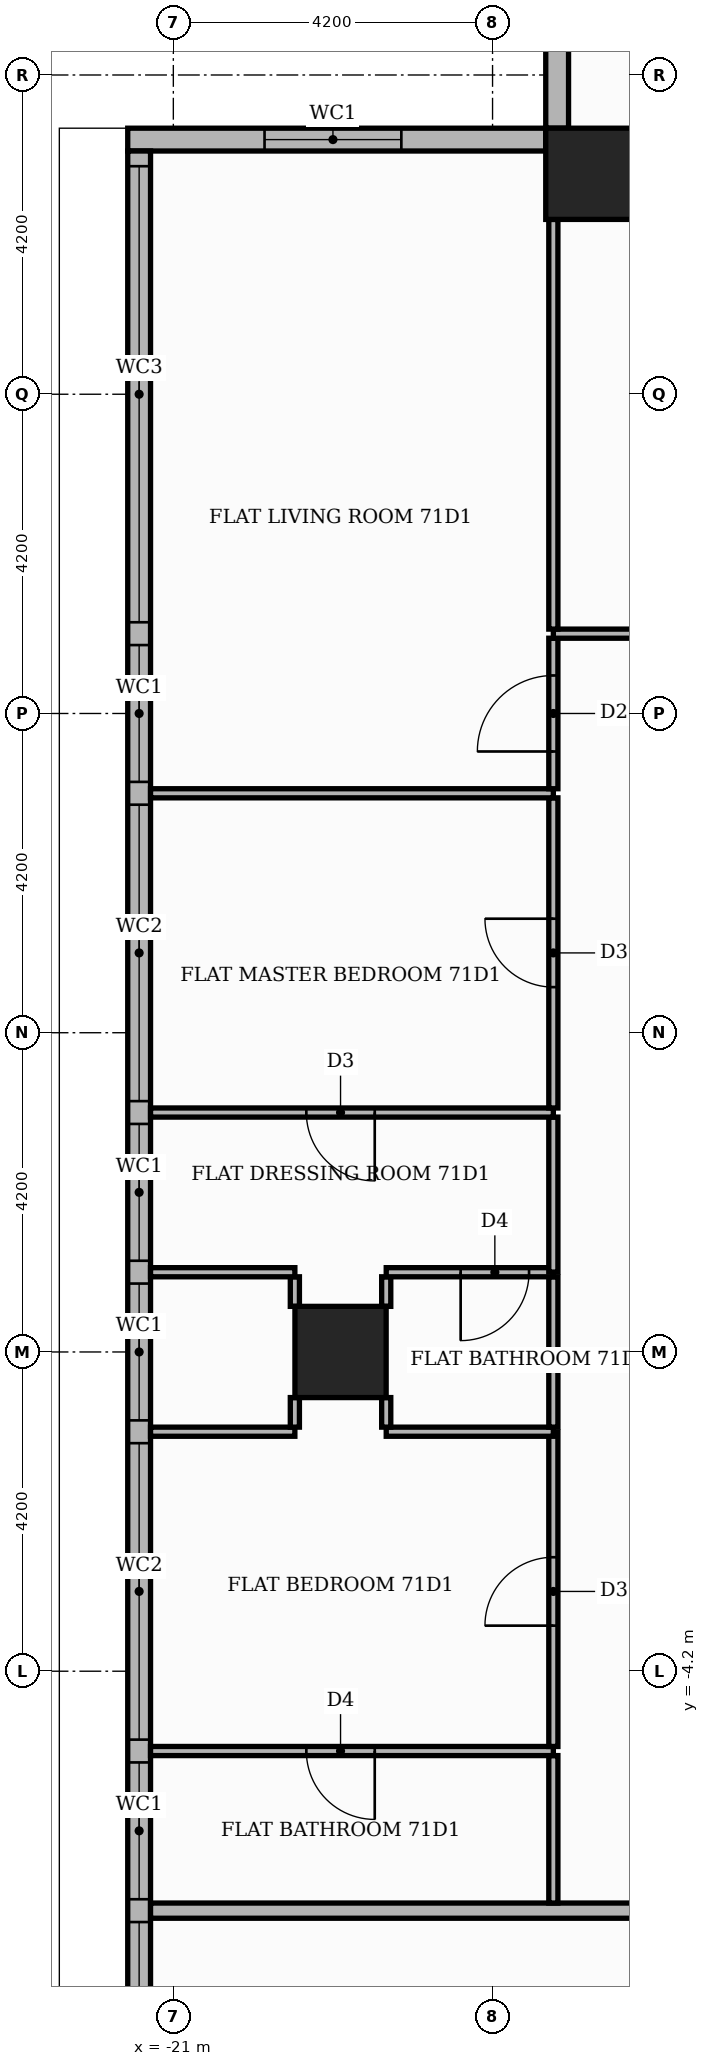
"""IFC4 building model, lengths in metres.
Left out: names, types, materials, properties, quantities, classifications, styles, units other than length and angle.
Written with IfcOpenShell. Run it as: python <this file> out.ifc"""

import sys

from ifc_helpers import new_model, si_unit, direction, frame, frame_2d, origin, origin_2d, place, context, subcontext, project, spatial, rectangle, extrude, element, fill, save


model = new_model("IFC4")
c1 = context("Model", 3, precision=1e-05, world=origin(), true_north=direction((0.0, 1.0)))
c2 = subcontext(c1, "Body", "Model", "MODEL_VIEW")
j1 = project(units=[si_unit("LENGTHUNIT", "METRE"), si_unit("PLANEANGLEUNIT", "RADIAN")], contexts=[c1])
p1 = place(None, origin())
s1 = spatial("IfcSite", under=j1, at=p1, CompositionType="ELEMENT")
p2 = place(p1, origin())
s2 = spatial("IfcBuilding", under=s1, at=p2, CompositionType="ELEMENT")
p3 = place(p2, frame((0.0, 0.0, 296.7)))
s3 = spatial("IfcBuildingStorey", under=s2, at=p3, CompositionType="ELEMENT", Elevation=296.7)
for number, where, z_axis, x_axis in (
    (1, (-18.8, 0.0, 0.0), (0.0, 0.0, 1.0), (1.0, 0.0, 0.0)),
    (2, (-15.5, 15.5, 0.0), (0.0, 0.0, 1.0), (1.0, 0.0, 0.0)),
):
    element("IfcColumn", number, at=place(p3, frame(where, z_axis=z_axis, x_axis=x_axis)), inside=s3, PredefinedType="COLUMN", context=c2, shape_type="SweptSolid", body=[
        extrude(rectangle(XDim=1.2, YDim=1.2, at=origin_2d()), origin(), (0.0, 0.0, 1.0), 3.9),
    ])
p4 = place(p3, frame((-15.95, 21.3, 0.0), z_axis=(0.0, 0.0, 1.0), x_axis=(0.0, -1.0, 0.0)))
e3 = element("IfcWall", 3, at=p4, inside=s3, PredefinedType="STANDARD", context=c2, shape_type="SweptSolid", body=[
    extrude(rectangle(XDim=5.2, YDim=0.3, at=frame_2d((2.6, 0.0))), origin(), (0.0, 0.0, 1.0), 3.55),
])
p5 = place(p4, frame((1.5, 0.0, 0.6)))
e4 = element("IfcOpeningElement", 4, at=p5, cuts=e3, PredefinedType="OPENING", context=c2, shape_type="SweptSolid", body=[
    extrude(rectangle(XDim=1.8, YDim=2.4, at=frame_2d((0.9, 1.2))), frame((0.0, 0.16, 0.0), z_axis=(0.0, -1.0, 0.0), x_axis=(1.0, 0.0, 0.0)), (0.0, 0.0, 1.0), 0.32),
])
p6 = place(p3, frame((-16.1, 15.95, 0.0), z_axis=(0.0, 0.0, 1.0), x_axis=(-1.0, 0.0, 0.0)))
e5 = element("IfcWall", 5, at=p6, inside=s3, PredefinedType="STANDARD", context=c2, shape_type="SweptSolid", body=[
    extrude(rectangle(XDim=5.5, YDim=0.3, at=frame_2d((2.75, 0.0))), origin(), (0.0, 0.0, 1.0), 3.55),
])
p7 = place(p6, frame((1.9, 0.0, 0.6)))
e6 = element("IfcOpeningElement", 6, at=p7, cuts=e5, PredefinedType="OPENING", context=c2, shape_type="SweptSolid", body=[
    extrude(rectangle(XDim=1.8, YDim=2.4, at=frame_2d((0.9, 1.2))), frame((0.0, 0.16, 0.0), z_axis=(0.0, -1.0, 0.0), x_axis=(1.0, 0.0, 0.0)), (0.0, 0.0, 1.0), 0.32),
])
p8 = place(p3, frame((-21.45, 15.8, 0.0), z_axis=(0.0, 0.0, 1.0), x_axis=(0.0, -1.0, 0.0)))
e7 = element("IfcWall", 7, at=p8, inside=s3, PredefinedType="STANDARD", context=c2, shape_type="SweptSolid", body=[
    extrude(rectangle(XDim=31.9, YDim=0.3, at=frame_2d((15.95, 0.0))), origin(), (0.0, 0.0, 1.0), 3.55),
])
p9 = place(p8, frame((0.2, 0.0, 0.6)))
e8 = element("IfcOpeningElement", 8, at=p9, cuts=e7, PredefinedType="OPENING", context=c2, shape_type="SweptSolid", body=[
    extrude(rectangle(XDim=6.0, YDim=2.4, at=frame_2d((3.0, 1.2))), frame((0.0, 0.16, 0.0), z_axis=(0.0, -1.0, 0.0), x_axis=(1.0, 0.0, 0.0)), (0.0, 0.0, 1.0), 0.32),
])
p10 = place(p8, frame((6.5, 0.0, 0.6)))
e9 = element("IfcOpeningElement", 9, at=p10, cuts=e7, PredefinedType="OPENING", context=c2, shape_type="SweptSolid", body=[
    extrude(rectangle(XDim=1.8, YDim=2.4, at=frame_2d((0.9, 1.2))), frame((0.0, 0.16, 0.0), z_axis=(0.0, -1.0, 0.0), x_axis=(1.0, 0.0, 0.0)), (0.0, 0.0, 1.0), 0.32),
])
p11 = place(p8, frame((8.6, 0.0, 0.6)))
e10 = element("IfcOpeningElement", 10, at=p11, cuts=e7, PredefinedType="OPENING", context=c2, shape_type="SweptSolid", body=[
    extrude(rectangle(XDim=3.9, YDim=2.4, at=frame_2d((1.95, 1.2))), frame((0.0, 0.16, 0.0), z_axis=(0.0, -1.0, 0.0), x_axis=(1.0, 0.0, 0.0)), (0.0, 0.0, 1.0), 0.32),
])
p12 = place(p8, frame((12.8, 0.0, 0.6)))
e11 = element("IfcOpeningElement", 11, at=p12, cuts=e7, PredefinedType="OPENING", context=c2, shape_type="SweptSolid", body=[
    extrude(rectangle(XDim=1.8, YDim=2.4, at=frame_2d((0.9, 1.2))), frame((0.0, 0.16, 0.0), z_axis=(0.0, -1.0, 0.0), x_axis=(1.0, 0.0, 0.0)), (0.0, 0.0, 1.0), 0.32),
])
p13 = place(p8, frame((14.9, 0.0, 0.6)))
e12 = element("IfcOpeningElement", 12, at=p13, cuts=e7, PredefinedType="OPENING", context=c2, shape_type="SweptSolid", body=[
    extrude(rectangle(XDim=1.8, YDim=2.4, at=frame_2d((0.9, 1.2))), frame((0.0, 0.16, 0.0), z_axis=(0.0, -1.0, 0.0), x_axis=(1.0, 0.0, 0.0)), (0.0, 0.0, 1.0), 0.32),
])
p14 = place(p8, frame((17.0, 0.0, 0.6)))
e13 = element("IfcOpeningElement", 13, at=p14, cuts=e7, PredefinedType="OPENING", context=c2, shape_type="SweptSolid", body=[
    extrude(rectangle(XDim=3.9, YDim=2.4, at=frame_2d((1.95, 1.2))), frame((0.0, 0.16, 0.0), z_axis=(0.0, -1.0, 0.0), x_axis=(1.0, 0.0, 0.0)), (0.0, 0.0, 1.0), 0.32),
])
p15 = place(p8, frame((21.2, 0.0, 0.6)))
e14 = element("IfcOpeningElement", 14, at=p15, cuts=e7, PredefinedType="OPENING", context=c2, shape_type="SweptSolid", body=[
    extrude(rectangle(XDim=1.8, YDim=2.4, at=frame_2d((0.9, 1.2))), frame((0.0, 0.16, 0.0), z_axis=(0.0, -1.0, 0.0), x_axis=(1.0, 0.0, 0.0)), (0.0, 0.0, 1.0), 0.32),
])
p16 = place(p8, frame((23.3, 0.0, 0.6)))
e15 = element("IfcOpeningElement", 15, at=p16, cuts=e7, PredefinedType="OPENING", context=c2, shape_type="SweptSolid", body=[
    extrude(rectangle(XDim=6.0, YDim=2.4, at=frame_2d((3.0, 1.2))), frame((0.0, 0.16, 0.0), z_axis=(0.0, -1.0, 0.0), x_axis=(1.0, 0.0, 0.0)), (0.0, 0.0, 1.0), 0.32),
])
p17 = place(p8, frame((29.6, 0.0, 0.6)))
e16 = element("IfcOpeningElement", 16, at=p17, cuts=e7, PredefinedType="OPENING", context=c2, shape_type="SweptSolid", body=[
    extrude(rectangle(XDim=1.8, YDim=2.4, at=frame_2d((0.9, 1.2))), frame((0.0, 0.16, 0.0), z_axis=(0.0, -1.0, 0.0), x_axis=(1.0, 0.0, 0.0)), (0.0, 0.0, 1.0), 0.32),
])
p18 = place(p3, frame((-21.3, -7.35, 0.0), z_axis=(0.0, 0.0, 1.0), x_axis=(1.0, 0.0, 0.0)))
e17 = element("IfcWall", 17, at=p18, inside=s3, PredefinedType="PARTITIONING", context=c2, shape_type="SweptSolid", body=[
    extrude(rectangle(XDim=28.65, YDim=0.2, at=frame_2d((14.325, 0.0))), origin(), (0.0, 0.0, 1.0), 3.55),
])
p19 = place(p18, frame((16.55, 0.0, 0.0)))
e18 = element("IfcOpeningElement", 18, at=p19, cuts=e17, PredefinedType="OPENING", context=c2, shape_type="SweptSolid", body=[
    extrude(rectangle(XDim=1.1, YDim=2.4, at=frame_2d((0.55, 1.2))), frame((0.0, 0.11, 0.0), z_axis=(0.0, -1.0, 0.0), x_axis=(1.0, 0.0, 0.0)), (0.0, 0.0, 1.0), 0.22),
])
p20 = place(p3, frame((-16.0, -7.25, 0.0), z_axis=(0.0, 0.0, 1.0), x_axis=(0.0, 1.0, 0.0)))
e19 = element("IfcWall", 19, at=p20, inside=s3, PredefinedType="PARTITIONING", context=c2, shape_type="SweptSolid", body=[
    extrude(rectangle(XDim=1.94, YDim=0.12, at=frame_2d((0.97, 0.0))), origin(), (0.0, 0.0, 1.0), 3.55),
])
p21 = place(p3, frame((-21.3, -5.25, 0.0), z_axis=(0.0, 0.0, 1.0), x_axis=(1.0, 0.0, 0.0)))
e20 = element("IfcWall", 20, at=p21, inside=s3, PredefinedType="PARTITIONING", context=c2, shape_type="SweptSolid", body=[
    extrude(rectangle(XDim=5.3, YDim=0.12, at=frame_2d((2.65, 0.0))), origin(), (0.0, 0.0, 1.0), 3.55),
])
p22 = place(p21, frame((2.05, 0.0, 0.0)))
e21 = element("IfcOpeningElement", 21, at=p22, cuts=e20, PredefinedType="OPENING", context=c2, shape_type="SweptSolid", body=[
    extrude(rectangle(XDim=0.9, YDim=2.1, at=frame_2d((0.45, 1.05))), frame((0.0, 0.07, 0.0), z_axis=(0.0, -1.0, 0.0), x_axis=(1.0, 0.0, 0.0)), (0.0, 0.0, 1.0), 0.14),
])
p23 = place(p3, frame((-16.0, -5.19, 0.0), z_axis=(0.0, 0.0, 1.0), x_axis=(0.0, 1.0, 0.0)))
e22 = element("IfcWall", 22, at=p23, inside=s3, PredefinedType="PARTITIONING", context=c2, shape_type="SweptSolid", body=[
    extrude(rectangle(XDim=4.139, YDim=0.12, at=frame_2d((2.069, 0.0))), origin(), (0.0, 0.0, 1.0), 3.55),
])
p24 = place(p23, frame((1.59, 0.0, 0.0)))
e23 = element("IfcOpeningElement", 23, at=p24, cuts=e22, PredefinedType="OPENING", context=c2, shape_type="SweptSolid", body=[
    extrude(rectangle(XDim=0.9, YDim=2.1, at=frame_2d((0.45, 1.05))), frame((0.0, 0.07, 0.0), z_axis=(0.0, -1.0, 0.0), x_axis=(1.0, 0.0, 0.0)), (0.0, 0.0, 1.0), 0.14),
])
p25 = place(p3, frame((-21.3, -1.049, 0.0), z_axis=(0.0, 0.0, 1.0), x_axis=(1.0, 0.0, 0.0)))
e24 = element("IfcWall", 24, at=p25, inside=s3, PredefinedType="PARTITIONING", context=c2, shape_type="SweptSolid", body=[
    extrude(rectangle(XDim=1.899, YDim=0.12, at=frame_2d((0.95, 0.0))), origin(), (0.0, 0.0, 1.0), 3.55),
])
p26 = place(p3, frame((-18.199, -1.049, 0.0), z_axis=(0.0, 0.0, 1.0), x_axis=(1.0, 0.0, 0.0)))
e25 = element("IfcWall", 25, at=p26, inside=s3, PredefinedType="PARTITIONING", context=c2, shape_type="SweptSolid", body=[
    extrude(rectangle(XDim=2.199, YDim=0.12, at=frame_2d((1.1, 0.0))), origin(), (0.0, 0.0, 1.0), 3.55),
])
for number, where, z_axis, x_axis in (
    (26, (-19.401, -0.989, 0.0), (0.0, 0.0, 1.0), (0.0, 1.0, 0.0)),
    (27, (-18.199, -0.989, 0.0), (0.0, 0.0, 1.0), (0.0, 1.0, 0.0)),
):
    element("IfcWall", number, at=place(p3, frame(where, z_axis=z_axis, x_axis=x_axis)), inside=s3, PredefinedType="PARTITIONING", context=c2, shape_type="SweptSolid", body=[
        extrude(rectangle(XDim=0.389, YDim=0.12, at=frame_2d((0.194, 0.0))), origin(), (0.0, 0.0, 1.0), 3.55),
    ])
p27 = place(p3, frame((-16.0, -0.989, 0.0), z_axis=(0.0, 0.0, 1.0), x_axis=(0.0, 1.0, 0.0)))
e28 = element("IfcWall", 28, at=p27, inside=s3, PredefinedType="PARTITIONING", context=c2, shape_type="SweptSolid", body=[
    extrude(rectangle(XDim=1.978, YDim=0.12, at=frame_2d((0.989, 0.0))), origin(), (0.0, 0.0, 1.0), 3.55),
])
for number, where, z_axis, x_axis in (
    (29, (-19.401, 0.6, 0.0), (0.0, 0.0, 1.0), (0.0, 1.0, 0.0)),
    (30, (-18.199, 0.6, 0.0), (0.0, 0.0, 1.0), (0.0, 1.0, 0.0)),
):
    element("IfcWall", number, at=place(p3, frame(where, z_axis=z_axis, x_axis=x_axis)), inside=s3, PredefinedType="PARTITIONING", context=c2, shape_type="SweptSolid", body=[
        extrude(rectangle(XDim=0.389, YDim=0.12, at=frame_2d((0.194, 0.0))), origin(), (0.0, 0.0, 1.0), 3.55),
    ])
p28 = place(p3, frame((-21.3, 1.049, 0.0), z_axis=(0.0, 0.0, 1.0), x_axis=(1.0, 0.0, 0.0)))
e31 = element("IfcWall", 31, at=p28, inside=s3, PredefinedType="PARTITIONING", context=c2, shape_type="SweptSolid", body=[
    extrude(rectangle(XDim=1.899, YDim=0.12, at=frame_2d((0.95, 0.0))), origin(), (0.0, 0.0, 1.0), 3.55),
])
p29 = place(p3, frame((-18.199, 1.049, 0.0), z_axis=(0.0, 0.0, 1.0), x_axis=(1.0, 0.0, 0.0)))
e32 = element("IfcWall", 32, at=p29, inside=s3, PredefinedType="PARTITIONING", context=c2, shape_type="SweptSolid", body=[
    extrude(rectangle(XDim=2.199, YDim=0.12, at=frame_2d((1.1, 0.0))), origin(), (0.0, 0.0, 1.0), 3.55),
])
p30 = place(p29, frame((0.979, 0.0, 0.0)))
e33 = element("IfcOpeningElement", 33, at=p30, cuts=e32, PredefinedType="OPENING", context=c2, shape_type="SweptSolid", body=[
    extrude(rectangle(XDim=0.9, YDim=2.1, at=frame_2d((0.45, 1.05))), frame((0.0, 0.07, 0.0), z_axis=(0.0, -1.0, 0.0), x_axis=(1.0, 0.0, 0.0)), (0.0, 0.0, 1.0), 0.14),
])
p31 = place(p3, frame((-16.0, 1.051, 0.0), z_axis=(0.0, 0.0, 1.0), x_axis=(0.0, 1.0, 0.0)))
e34 = element("IfcWall", 34, at=p31, inside=s3, PredefinedType="PARTITIONING", context=c2, shape_type="SweptSolid", body=[
    extrude(rectangle(XDim=2.039, YDim=0.12, at=frame_2d((1.02, 0.0))), origin(), (0.0, 0.0, 1.0), 3.55),
])
p32 = place(p3, frame((-21.3, 3.15, 0.0), z_axis=(0.0, 0.0, 1.0), x_axis=(1.0, 0.0, 0.0)))
e35 = element("IfcWall", 35, at=p32, inside=s3, PredefinedType="PARTITIONING", context=c2, shape_type="SweptSolid", body=[
    extrude(rectangle(XDim=5.3, YDim=0.12, at=frame_2d((2.65, 0.0))), origin(), (0.0, 0.0, 1.0), 3.55),
])
p33 = place(p32, frame((2.05, 0.0, 0.0)))
e36 = element("IfcOpeningElement", 36, at=p33, cuts=e35, PredefinedType="OPENING", context=c2, shape_type="SweptSolid", body=[
    extrude(rectangle(XDim=0.9, YDim=2.1, at=frame_2d((0.45, 1.05))), frame((0.0, 0.07, 0.0), z_axis=(0.0, -1.0, 0.0), x_axis=(1.0, 0.0, 0.0)), (0.0, 0.0, 1.0), 0.14),
])
p34 = place(p3, frame((-16.0, 3.21, 0.0), z_axis=(0.0, 0.0, 1.0), x_axis=(0.0, 1.0, 0.0)))
e37 = element("IfcWall", 37, at=p34, inside=s3, PredefinedType="PARTITIONING", context=c2, shape_type="SweptSolid", body=[
    extrude(rectangle(XDim=4.08, YDim=0.12, at=frame_2d((2.04, 0.0))), origin(), (0.0, 0.0, 1.0), 3.55),
])
p35 = place(p34, frame((1.59, 0.0, 0.0)))
e38 = element("IfcOpeningElement", 38, at=p35, cuts=e37, PredefinedType="OPENING", context=c2, shape_type="SweptSolid", body=[
    extrude(rectangle(XDim=0.9, YDim=2.1, at=frame_2d((0.45, 1.05))), frame((0.0, 0.07, 0.0), z_axis=(0.0, -1.0, 0.0), x_axis=(1.0, 0.0, 0.0)), (0.0, 0.0, 1.0), 0.14),
])
p36 = place(p3, frame((-21.3, 7.35, 0.0), z_axis=(0.0, 0.0, 1.0), x_axis=(1.0, 0.0, 0.0)))
e39 = element("IfcWall", 39, at=p36, inside=s3, PredefinedType="PARTITIONING", context=c2, shape_type="SweptSolid", body=[
    extrude(rectangle(XDim=5.3, YDim=0.12, at=frame_2d((2.65, 0.0))), origin(), (0.0, 0.0, 1.0), 3.55),
])
p37 = place(p3, frame((-16.0, 7.41, 0.0), z_axis=(0.0, 0.0, 1.0), x_axis=(0.0, 1.0, 0.0)))
e40 = element("IfcWall", 40, at=p37, inside=s3, PredefinedType="PARTITIONING", context=c2, shape_type="SweptSolid", body=[
    extrude(rectangle(XDim=1.98, YDim=0.12, at=frame_2d((0.99, 0.0))), origin(), (0.0, 0.0, 1.0), 3.55),
])
p38 = place(p37, frame((0.49, 0.0, 0.0)))
e41 = element("IfcOpeningElement", 41, at=p38, cuts=e40, PredefinedType="OPENING", context=c2, shape_type="SweptSolid", body=[
    extrude(rectangle(XDim=1.0, YDim=2.1, at=frame_2d((0.5, 1.05))), frame((0.0, 0.07, 0.0), z_axis=(0.0, -1.0, 0.0), x_axis=(1.0, 0.0, 0.0)), (0.0, 0.0, 1.0), 0.14),
])
p39 = place(p3, frame((-16.0, 9.45, 0.0), z_axis=(0.0, 0.0, 1.0), x_axis=(1.0, 0.0, 0.0)))
e42 = element("IfcWall", 42, at=p39, inside=s3, PredefinedType="PARTITIONING", context=c2, shape_type="SweptSolid", body=[
    extrude(rectangle(XDim=8.55, YDim=0.12, at=frame_2d((4.275, 0.0))), origin(), (0.0, 0.0, 1.0), 3.55),
])
p40 = place(p39, frame((3.875, 0.0, 0.0)))
e43 = element("IfcOpeningElement", 43, at=p40, cuts=e42, PredefinedType="OPENING", context=c2, shape_type="SweptSolid", body=[
    extrude(rectangle(XDim=0.9, YDim=2.1, at=frame_2d((0.45, 1.05))), frame((0.0, 0.07, 0.0), z_axis=(0.0, -1.0, 0.0), x_axis=(1.0, 0.0, 0.0)), (0.0, 0.0, 1.0), 0.14),
])
p41 = place(p3, frame((-16.0, 9.51, 0.0), z_axis=(0.0, 0.0, 1.0), x_axis=(0.0, 1.0, 0.0)))
e44 = element("IfcWall", 44, at=p41, inside=s3, PredefinedType="PARTITIONING", context=c2, shape_type="SweptSolid", body=[
    extrude(rectangle(XDim=5.39, YDim=0.12, at=frame_2d((2.695, 0.0))), origin(), (0.0, 0.0, 1.0), 3.55),
])
p42 = place(p7, origin())
e45 = element("IfcWindow", 45, at=p42, inside=s3, PartitioningType="SINGLE_PANEL", PredefinedType="WINDOW", context=c2, shape_type="SweptSolid", body=[
    extrude(rectangle(XDim=1.8, YDim=2.4, at=frame_2d((0.9, 1.2))), frame((0.0, 0.03, 0.0), z_axis=(0.0, -1.0, 0.0), x_axis=(1.0, 0.0, 0.0)), (0.0, 0.0, 1.0), 0.06),
])
fill(e6, e45)
p43 = place(p9, origin())
e46 = element("IfcWindow", 46, at=p43, inside=s3, PartitioningType="SINGLE_PANEL", PredefinedType="WINDOW", context=c2, shape_type="SweptSolid", body=[
    extrude(rectangle(XDim=6.0, YDim=2.4, at=frame_2d((3.0, 1.2))), frame((0.0, 0.03, 0.0), z_axis=(0.0, -1.0, 0.0), x_axis=(1.0, 0.0, 0.0)), (0.0, 0.0, 1.0), 0.06),
])
fill(e8, e46)
p44 = place(p10, origin())
e47 = element("IfcWindow", 47, at=p44, inside=s3, PartitioningType="SINGLE_PANEL", PredefinedType="WINDOW", context=c2, shape_type="SweptSolid", body=[
    extrude(rectangle(XDim=1.8, YDim=2.4, at=frame_2d((0.9, 1.2))), frame((0.0, 0.03, 0.0), z_axis=(0.0, -1.0, 0.0), x_axis=(1.0, 0.0, 0.0)), (0.0, 0.0, 1.0), 0.06),
])
fill(e9, e47)
p45 = place(p11, origin())
e48 = element("IfcWindow", 48, at=p45, inside=s3, PartitioningType="SINGLE_PANEL", PredefinedType="WINDOW", context=c2, shape_type="SweptSolid", body=[
    extrude(rectangle(XDim=3.9, YDim=2.4, at=frame_2d((1.95, 1.2))), frame((0.0, 0.03, 0.0), z_axis=(0.0, -1.0, 0.0), x_axis=(1.0, 0.0, 0.0)), (0.0, 0.0, 1.0), 0.06),
])
fill(e10, e48)
p46 = place(p12, origin())
e49 = element("IfcWindow", 49, at=p46, inside=s3, PartitioningType="SINGLE_PANEL", PredefinedType="WINDOW", context=c2, shape_type="SweptSolid", body=[
    extrude(rectangle(XDim=1.8, YDim=2.4, at=frame_2d((0.9, 1.2))), frame((0.0, 0.03, 0.0), z_axis=(0.0, -1.0, 0.0), x_axis=(1.0, 0.0, 0.0)), (0.0, 0.0, 1.0), 0.06),
])
fill(e11, e49)
p47 = place(p13, origin())
e50 = element("IfcWindow", 50, at=p47, inside=s3, PartitioningType="SINGLE_PANEL", PredefinedType="WINDOW", context=c2, shape_type="SweptSolid", body=[
    extrude(rectangle(XDim=1.8, YDim=2.4, at=frame_2d((0.9, 1.2))), frame((0.0, 0.03, 0.0), z_axis=(0.0, -1.0, 0.0), x_axis=(1.0, 0.0, 0.0)), (0.0, 0.0, 1.0), 0.06),
])
fill(e12, e50)
p48 = place(p14, origin())
e51 = element("IfcWindow", 51, at=p48, inside=s3, PartitioningType="SINGLE_PANEL", PredefinedType="WINDOW", context=c2, shape_type="SweptSolid", body=[
    extrude(rectangle(XDim=3.9, YDim=2.4, at=frame_2d((1.95, 1.2))), frame((0.0, 0.03, 0.0), z_axis=(0.0, -1.0, 0.0), x_axis=(1.0, 0.0, 0.0)), (0.0, 0.0, 1.0), 0.06),
])
fill(e13, e51)
p49 = place(p15, origin())
e52 = element("IfcWindow", 52, at=p49, inside=s3, PartitioningType="SINGLE_PANEL", PredefinedType="WINDOW", context=c2, shape_type="SweptSolid", body=[
    extrude(rectangle(XDim=1.8, YDim=2.4, at=frame_2d((0.9, 1.2))), frame((0.0, 0.03, 0.0), z_axis=(0.0, -1.0, 0.0), x_axis=(1.0, 0.0, 0.0)), (0.0, 0.0, 1.0), 0.06),
])
fill(e14, e52)
p50 = place(p16, origin())
e53 = element("IfcWindow", 53, at=p50, inside=s3, PartitioningType="SINGLE_PANEL", PredefinedType="WINDOW", context=c2, shape_type="SweptSolid", body=[
    extrude(rectangle(XDim=6.0, YDim=2.4, at=frame_2d((3.0, 1.2))), frame((0.0, 0.03, 0.0), z_axis=(0.0, -1.0, 0.0), x_axis=(1.0, 0.0, 0.0)), (0.0, 0.0, 1.0), 0.06),
])
fill(e15, e53)
p51 = place(p38, origin())
e54 = element("IfcDoor", 54, at=p51, inside=s3, OperationType="SINGLE_SWING_LEFT", PredefinedType="DOOR", context=c2, shape_type="SweptSolid", body=[
    extrude(rectangle(XDim=1.0, YDim=2.1, at=frame_2d((0.5, 1.05))), frame((0.0, 0.025, 0.0), z_axis=(0.0, -1.0, 0.0), x_axis=(1.0, 0.0, 0.0)), (0.0, 0.0, 1.0), 0.05),
])
fill(e41, e54)
p52 = place(p35, origin())
e55 = element("IfcDoor", 55, at=p52, inside=s3, OperationType="SINGLE_SWING_RIGHT", PredefinedType="DOOR", context=c2, shape_type="SweptSolid", body=[
    extrude(rectangle(XDim=0.9, YDim=2.1, at=frame_2d((0.45, 1.05))), frame((0.0, 0.025, 0.0), z_axis=(0.0, -1.0, 0.0), x_axis=(1.0, 0.0, 0.0)), (0.0, 0.0, 1.0), 0.05),
])
fill(e38, e55)
p53 = place(p33, frame((0.9, 0.0, 0.0), z_axis=(0.0, 0.0, 1.0), x_axis=(-1.0, 0.0, 0.0)))
e56 = element("IfcDoor", 56, at=p53, inside=s3, OperationType="SINGLE_SWING_RIGHT", PredefinedType="DOOR", context=c2, shape_type="SweptSolid", body=[
    extrude(rectangle(XDim=0.9, YDim=2.1, at=frame_2d((0.45, 1.05))), frame((0.0, 0.025, 0.0), z_axis=(0.0, -1.0, 0.0), x_axis=(1.0, 0.0, 0.0)), (0.0, 0.0, 1.0), 0.05),
])
fill(e36, e56)
p54 = place(p30, frame((0.9, 0.0, 0.0), z_axis=(0.0, 0.0, 1.0), x_axis=(-1.0, 0.0, 0.0)))
e57 = element("IfcDoor", 57, at=p54, inside=s3, OperationType="SINGLE_SWING_LEFT", PredefinedType="DOOR", context=c2, shape_type="SweptSolid", body=[
    extrude(rectangle(XDim=0.9, YDim=2.1, at=frame_2d((0.45, 1.05))), frame((0.0, 0.025, 0.0), z_axis=(0.0, -1.0, 0.0), x_axis=(1.0, 0.0, 0.0)), (0.0, 0.0, 1.0), 0.05),
])
fill(e33, e57)
p55 = place(p24, origin())
e58 = element("IfcDoor", 58, at=p55, inside=s3, OperationType="SINGLE_SWING_LEFT", PredefinedType="DOOR", context=c2, shape_type="SweptSolid", body=[
    extrude(rectangle(XDim=0.9, YDim=2.1, at=frame_2d((0.45, 1.05))), frame((0.0, 0.025, 0.0), z_axis=(0.0, -1.0, 0.0), x_axis=(1.0, 0.0, 0.0)), (0.0, 0.0, 1.0), 0.05),
])
fill(e23, e58)
p56 = place(p22, frame((0.9, 0.0, 0.0), z_axis=(0.0, 0.0, 1.0), x_axis=(-1.0, 0.0, 0.0)))
e59 = element("IfcDoor", 59, at=p56, inside=s3, OperationType="SINGLE_SWING_RIGHT", PredefinedType="DOOR", context=c2, shape_type="SweptSolid", body=[
    extrude(rectangle(XDim=0.9, YDim=2.1, at=frame_2d((0.45, 1.05))), frame((0.0, 0.025, 0.0), z_axis=(0.0, -1.0, 0.0), x_axis=(1.0, 0.0, 0.0)), (0.0, 0.0, 1.0), 0.05),
])
fill(e21, e59)
save(model, sys.argv[1])
